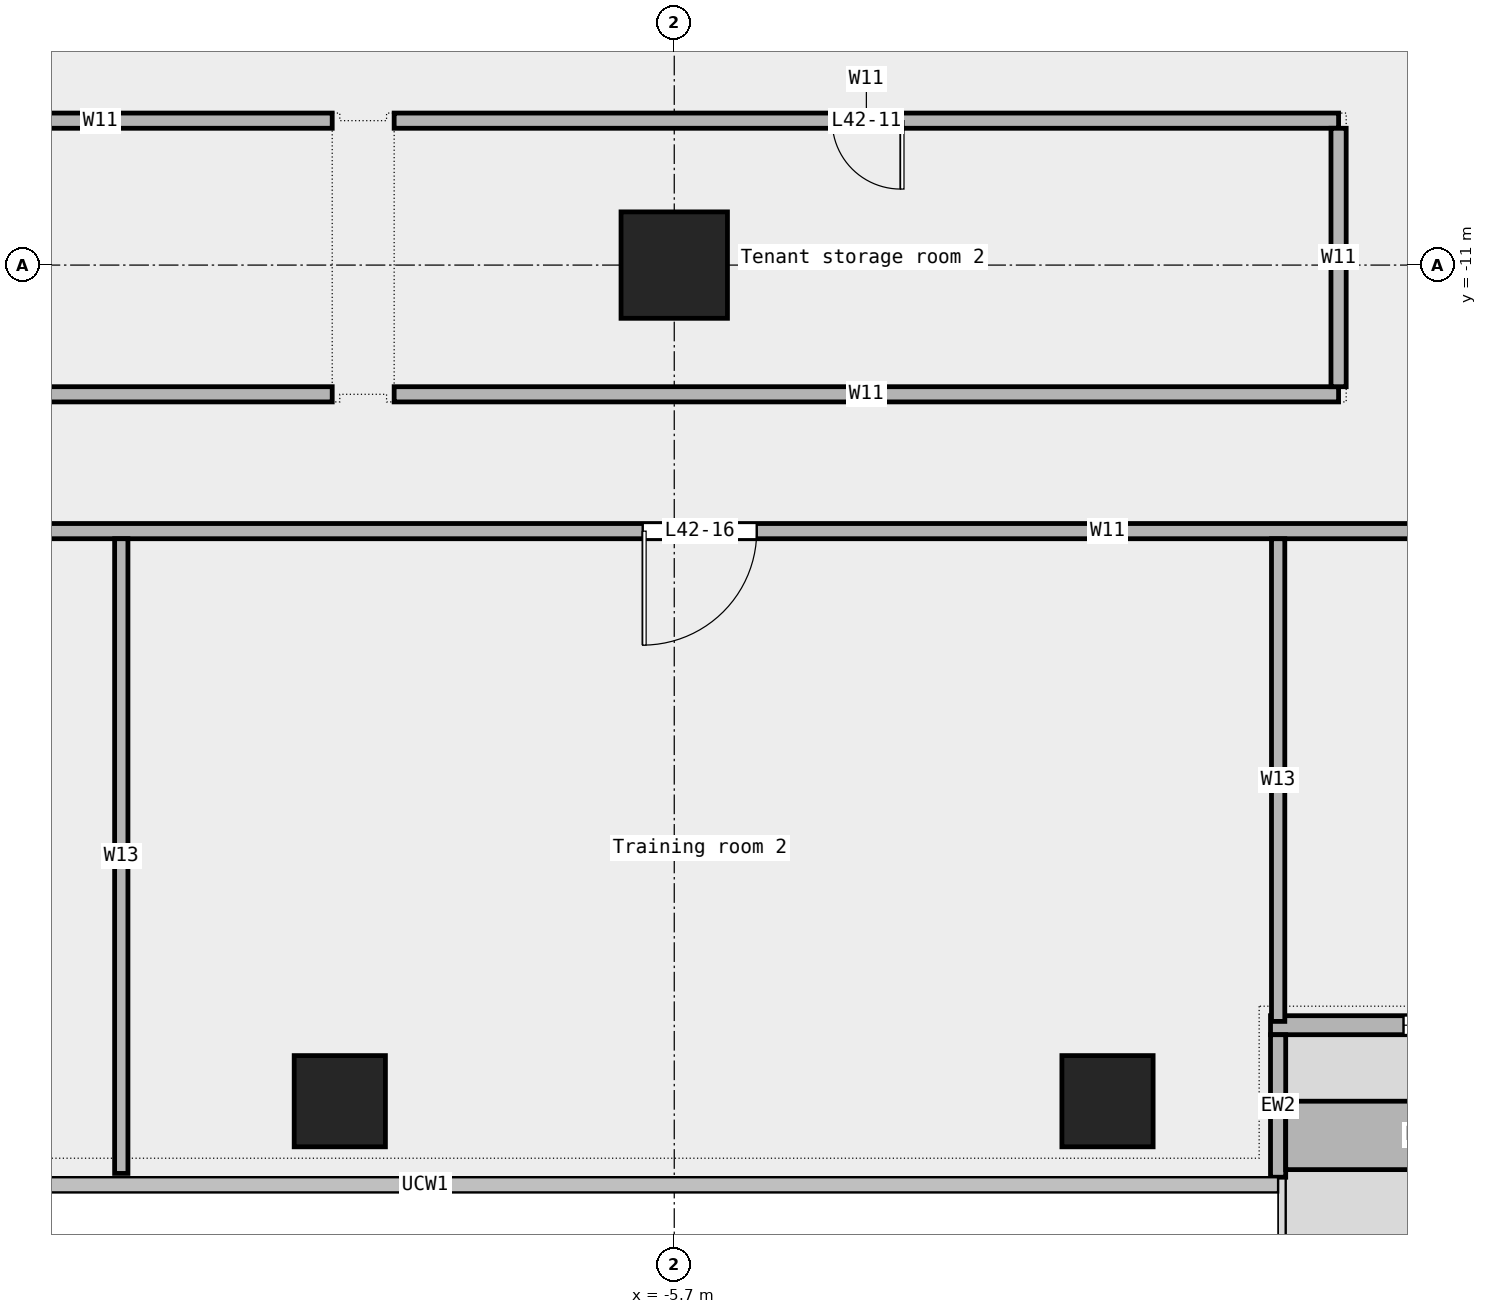
"""IFC4 building model, lengths in metres.
Left out: names, types, materials, properties, quantities, classifications, styles, units other than length and angle.
Written with IfcOpenShell. Run it as: python <this file> out.ifc"""

import sys

from ifc_helpers import new_model, si_unit, direction, frame, frame_2d, origin, origin_2d, place, context, subcontext, project, spatial, rectangle, extrude, element, fill, save


model = new_model("IFC4")
c1 = context("Model", 3, precision=1e-05, world=origin(), true_north=direction((0.0, 1.0)))
c2 = subcontext(c1, "Body", "Model", "MODEL_VIEW")
j1 = project(units=[si_unit("LENGTHUNIT", "METRE"), si_unit("PLANEANGLEUNIT", "RADIAN")], contexts=[c1])
p1 = place(None, origin())
s1 = spatial("IfcSite", under=j1, at=p1, CompositionType="ELEMENT")
p2 = place(p1, origin())
s2 = spatial("IfcBuilding", under=s1, at=p2, CompositionType="ELEMENT")
p3 = place(p2, frame((0.0, 0.0, 201.0)))
s3 = spatial("IfcBuildingStorey", under=s2, at=p3, CompositionType="ELEMENT", Elevation=201.0)
for number, where, z_axis, x_axis in (
    (1, (-10.1, -22.0, 0.0), (0.0, 0.0, 1.0), (1.0, 0.0, 0.0)),
    (2, (0.0, -22.0, 0.0), (0.0, 0.0, 1.0), (1.0, 0.0, 0.0)),
):
    element("IfcColumn", number, at=place(p3, frame(where, z_axis=z_axis, x_axis=x_axis)), inside=s3, PredefinedType="COLUMN", context=c2, shape_type="SweptSolid", body=[
        extrude(rectangle(XDim=1.2, YDim=1.2, at=origin_2d()), origin(), (0.0, 0.0, 1.0), 3.4),
    ])
p4 = place(p3, frame((-5.7, -11.0, 0.0), z_axis=(0.0, 0.0, 1.0), x_axis=(1.0, 0.0, 0.0)))
e3 = element("IfcColumn", 3, at=p4, inside=s3, PredefinedType="COLUMN", context=c2, shape_type="SweptSolid", body=[
    extrude(rectangle(XDim=1.4, YDim=1.4, at=origin_2d()), origin(), (0.0, 0.0, 1.0), 3.4),
])
p5 = place(p3, frame((2.145, -21.0, 0.0), z_axis=(0.0, 0.0, 1.0), x_axis=(1.0, 0.0, 0.0)))
e4 = element("IfcWall", 4, at=p5, inside=s3, PredefinedType="STANDARD", context=c2, shape_type="SweptSolid", body=[
    extrude(rectangle(XDim=13.667, YDim=0.25, at=frame_2d((6.833, 0.0))), origin(), (0.0, 0.0, 1.0), 3.4),
])
p6 = place(p5, frame((1.75, 0.0, 0.45)))
e5 = element("IfcOpeningElement", 5, at=p6, cuts=e4, PredefinedType="OPENING", context=c2, shape_type="SweptSolid", body=[
    extrude(rectangle(XDim=1.5, YDim=2.4, at=frame_2d((0.75, 1.2))), frame((0.0, 0.137, 0.0), z_axis=(0.0, -1.0, 0.0), x_axis=(1.0, 0.0, 0.0)), (0.0, 0.0, 1.0), 0.274),
])
p7 = place(p5, frame((5.25, 0.0, 0.0)))
e6 = element("IfcOpeningElement", 6, at=p7, cuts=e4, PredefinedType="OPENING", context=c2, shape_type="SweptSolid", body=[
    extrude(rectangle(XDim=1.8, YDim=2.4, at=frame_2d((0.9, 1.2))), frame((0.0, 0.137, 0.0), z_axis=(0.0, -1.0, 0.0), x_axis=(1.0, 0.0, 0.0)), (0.0, 0.0, 1.0), 0.274),
])
p8 = place(p5, frame((10.5, 0.0, 0.45)))
e7 = element("IfcOpeningElement", 7, at=p8, cuts=e4, PredefinedType="OPENING", context=c2, shape_type="SweptSolid", body=[
    extrude(rectangle(XDim=1.5, YDim=2.4, at=frame_2d((0.75, 1.2))), frame((0.0, 0.137, 0.0), z_axis=(0.0, -1.0, 0.0), x_axis=(1.0, 0.0, 0.0)), (0.0, 0.0, 1.0), 0.274),
])
p9 = place(p3, frame((2.244, -23.0, 0.0), z_axis=(0.0, 0.0, 1.0), x_axis=(0.0, 1.0, 0.0)))
e8 = element("IfcWall", 8, at=p9, inside=s3, PredefinedType="STANDARD", context=c2, shape_type="SweptSolid", body=[
    extrude(rectangle(XDim=1.875, YDim=0.2, at=frame_2d((0.938, 0.0))), origin(), (0.0, 0.0, 1.0), 3.4),
])
p10 = place(p3, frame((2.344, -22.45, 0.0), z_axis=(0.0, 0.0, 1.0), x_axis=(1.0, 0.0, 0.0)))
e9 = element("IfcWall", 9, at=p10, inside=s3, PredefinedType="STANDARD", context=c2, shape_type="SweptSolid", body=[
    extrude(rectangle(XDim=3.6, YDim=0.9, at=frame_2d((1.8, 0.0))), origin(), (0.0, 0.0, 1.0), 0.7),
])
p11 = place(p3, frame((-26.15, -14.5, 0.0), z_axis=(0.0, 0.0, 1.0), x_axis=(1.0, 0.0, 0.0)))
e10 = element("IfcWall", 10, at=p11, inside=s3, PredefinedType="PARTITIONING", context=c2, shape_type="SweptSolid", body=[
    extrude(rectangle(XDim=52.3, YDim=0.2, at=frame_2d((26.15, 0.0))), origin(), (0.0, 0.0, 1.0), 3.4),
])
p12 = place(p11, frame((46.38, 0.0, 0.0)))
e11 = element("IfcOpeningElement", 11, at=p12, cuts=e10, PredefinedType="OPENING", context=c2, shape_type="SweptSolid", body=[
    extrude(rectangle(XDim=1.2, YDim=2.1, at=frame_2d((0.6, 1.05))), frame((0.0, 0.112, 0.0), z_axis=(0.0, -1.0, 0.0), x_axis=(1.0, 0.0, 0.0)), (0.0, 0.0, 1.0), 0.224),
])
p13 = place(p11, frame((5.938, 0.0, 0.0)))
e12 = element("IfcOpeningElement", 12, at=p13, cuts=e10, PredefinedType="OPENING", context=c2, shape_type="SweptSolid", body=[
    extrude(rectangle(XDim=1.5, YDim=2.1, at=frame_2d((0.75, 1.05))), frame((0.0, 0.112, 0.0), z_axis=(0.0, -1.0, 0.0), x_axis=(1.0, 0.0, 0.0)), (0.0, 0.0, 1.0), 0.224),
])
p14 = place(p11, frame((20.035, 0.0, 0.0)))
e13 = element("IfcOpeningElement", 13, at=p14, cuts=e10, PredefinedType="OPENING", context=c2, shape_type="SweptSolid", body=[
    extrude(rectangle(XDim=1.5, YDim=2.1, at=frame_2d((0.75, 1.05))), frame((0.0, 0.112, 0.0), z_axis=(0.0, -1.0, 0.0), x_axis=(1.0, 0.0, 0.0)), (0.0, 0.0, 1.0), 0.224),
])
p15 = place(p11, frame((34.528, 0.0, 0.0)))
e14 = element("IfcOpeningElement", 14, at=p15, cuts=e10, PredefinedType="OPENING", context=c2, shape_type="SweptSolid", body=[
    extrude(rectangle(XDim=1.2, YDim=2.1, at=frame_2d((0.6, 1.05))), frame((0.0, 0.112, 0.0), z_axis=(0.0, -1.0, 0.0), x_axis=(1.0, 0.0, 0.0)), (0.0, 0.0, 1.0), 0.224),
])
p16 = place(p3, frame((-24.15, -12.7, 0.0), z_axis=(0.0, 0.0, 1.0), x_axis=(1.0, 0.0, 0.0)))
e15 = element("IfcWall", 15, at=p16, inside=s3, PredefinedType="PARTITIONING", context=c2, shape_type="SweptSolid", body=[
    extrude(rectangle(XDim=13.95, YDim=0.2, at=frame_2d((6.975, 0.0))), origin(), (0.0, 0.0, 1.0), 3.4),
])
p17 = place(p16, frame((7.825, 0.0, 0.0)))
e16 = element("IfcOpeningElement", 16, at=p17, cuts=e15, PredefinedType="OPENING", context=c2, shape_type="SweptSolid", body=[
    extrude(rectangle(XDim=1.5, YDim=2.1, at=frame_2d((0.75, 1.05))), frame((0.0, 0.112, 0.0), z_axis=(0.0, -1.0, 0.0), x_axis=(1.0, 0.0, 0.0)), (0.0, 0.0, 1.0), 0.224),
])
p18 = place(p3, frame((-9.385, -12.7, 0.0), z_axis=(0.0, 0.0, 1.0), x_axis=(1.0, 0.0, 0.0)))
e17 = element("IfcWall", 17, at=p18, inside=s3, PredefinedType="PARTITIONING", context=c2, shape_type="SweptSolid", body=[
    extrude(rectangle(XDim=12.425, YDim=0.2, at=frame_2d((6.212, 0.0))), origin(), (0.0, 0.0, 1.0), 3.4),
])
p19 = place(p3, frame((-16.3, -9.1, 0.0), z_axis=(0.0, 0.0, 1.0), x_axis=(1.0, 0.0, 0.0)))
e18 = element("IfcWall", 18, at=p19, inside=s3, PredefinedType="PARTITIONING", context=c2, shape_type="SweptSolid", body=[
    extrude(rectangle(XDim=6.1, YDim=0.2, at=frame_2d((3.05, 0.0))), origin(), (0.0, 0.0, 1.0), 3.4),
])
p20 = place(p3, frame((-9.385, -9.1, 0.0), z_axis=(0.0, 0.0, 1.0), x_axis=(1.0, 0.0, 0.0)))
e19 = element("IfcWall", 19, at=p20, inside=s3, PredefinedType="PARTITIONING", context=c2, shape_type="SweptSolid", body=[
    extrude(rectangle(XDim=12.425, YDim=0.2, at=frame_2d((6.212, 0.0))), origin(), (0.0, 0.0, 1.0), 3.4),
])
p21 = place(p20, frame((5.762, 0.0, 0.0)))
e20 = element("IfcOpeningElement", 20, at=p21, cuts=e19, PredefinedType="OPENING", context=c2, shape_type="SweptSolid", body=[
    extrude(rectangle(XDim=0.9, YDim=2.1, at=frame_2d((0.45, 1.05))), frame((0.0, 0.112, 0.0), z_axis=(0.0, -1.0, 0.0), x_axis=(1.0, 0.0, 0.0)), (0.0, 0.0, 1.0), 0.224),
])
p22 = place(p3, frame((-12.975, -22.95, 0.0), z_axis=(0.0, 0.0, 1.0), x_axis=(0.0, 1.0, 0.0)))
e21 = element("IfcWall", 21, at=p22, inside=s3, PredefinedType="PARTITIONING", context=c2, shape_type="SweptSolid", body=[
    extrude(rectangle(XDim=8.35, YDim=0.175, at=frame_2d((4.175, 0.0))), origin(), (0.0, 0.0, 1.0), 3.4),
])
p23 = place(p3, frame((2.245, -20.95, 0.0), z_axis=(0.0, 0.0, 1.0), x_axis=(0.0, 1.0, 0.0)))
e22 = element("IfcWall", 22, at=p23, inside=s3, PredefinedType="PARTITIONING", context=c2, shape_type="SweptSolid", body=[
    extrude(rectangle(XDim=6.35, YDim=0.175, at=frame_2d((3.175, 0.0))), origin(), (0.0, 0.0, 1.0), 3.4),
])
p24 = place(p3, frame((3.04, -12.6, 0.0), z_axis=(0.0, 0.0, 1.0), x_axis=(0.0, 1.0, 0.0)))
e23 = element("IfcWall", 23, at=p24, inside=s3, PredefinedType="PARTITIONING", context=c2, shape_type="SweptSolid", body=[
    extrude(rectangle(XDim=3.4, YDim=0.2, at=frame_2d((1.7, 0.0))), origin(), (0.0, 0.0, 1.0), 3.4),
])
p25 = place(p6, origin())
e24 = element("IfcWindow", 24, at=p25, inside=s3, PartitioningType="SINGLE_PANEL", PredefinedType="WINDOW", context=c2, shape_type="SweptSolid", body=[
    extrude(rectangle(XDim=1.5, YDim=2.4, at=frame_2d((0.75, 1.2))), frame((0.0, 0.03, 0.0), z_axis=(0.0, -1.0, 0.0), x_axis=(1.0, 0.0, 0.0)), (0.0, 0.0, 1.0), 0.06),
])
fill(e5, e24)
p26 = place(p21, origin())
e25 = element("IfcDoor", 25, at=p26, inside=s3, OperationType="SINGLE_SWING_LEFT", PredefinedType="DOOR", context=c2, shape_type="SweptSolid", body=[
    extrude(rectangle(XDim=0.9, YDim=2.1, at=frame_2d((0.45, 1.05))), frame((0.0, 0.025, 0.0), z_axis=(0.0, -1.0, 0.0), x_axis=(1.0, 0.0, 0.0)), (0.0, 0.0, 1.0), 0.05),
])
fill(e20, e25)
p27 = place(p14, origin())
e26 = element("IfcDoor", 26, at=p27, inside=s3, OperationType="DOUBLE_DOOR_SINGLE_SWING", PredefinedType="DOOR", context=c2, shape_type="SweptSolid", body=[
    extrude(rectangle(XDim=1.5, YDim=2.1, at=frame_2d((0.75, 1.05))), frame((0.0, 0.025, 0.0), z_axis=(0.0, -1.0, 0.0), x_axis=(1.0, 0.0, 0.0)), (0.0, 0.0, 1.0), 0.05),
])
fill(e13, e26)
save(model, sys.argv[1])
